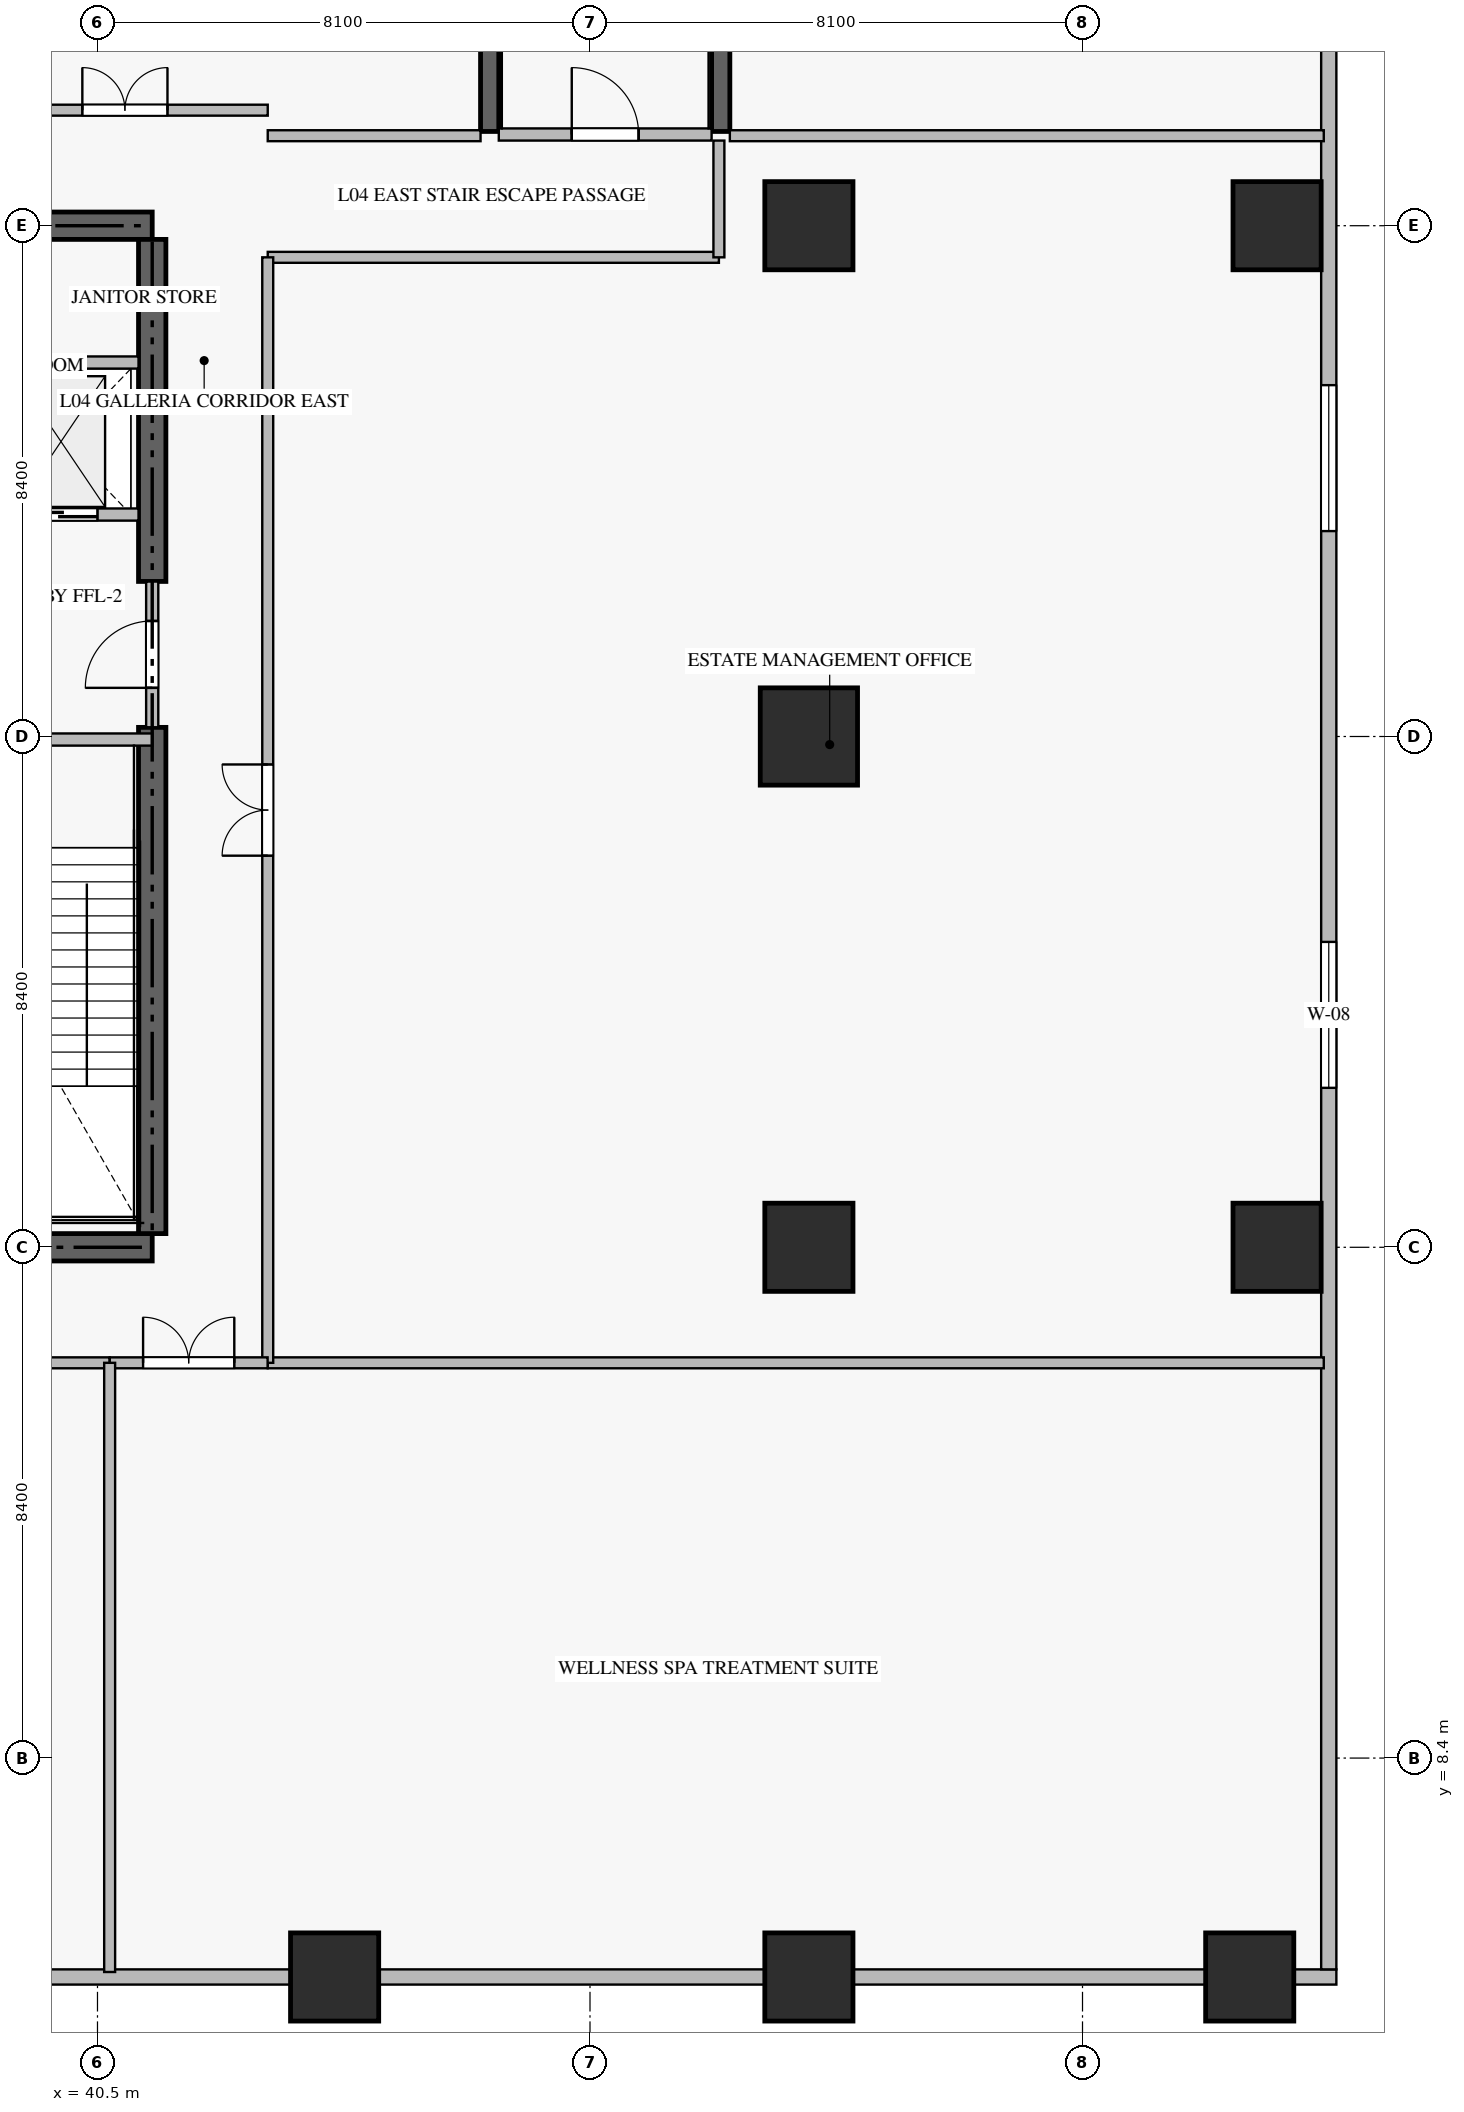
"""IFC4 building model, lengths in metres.
Left out: names, types, materials, properties, quantities, classifications, styles, units other than length and angle.
Written with IfcOpenShell. Run it as: python <this file> out.ifc"""

import sys

from ifc_helpers import new_model, si_unit, direction, frame, frame_2d, origin, origin_2d, place, context, subcontext, project, spatial, rectangle, extrude, source, transform, mapped, element, fill, save


model = new_model("IFC4")
c1 = context("Model", 3, precision=1e-05, world=origin(), true_north=direction((0.0, 1.0)))
c2 = subcontext(c1, "Body", "Model", "MODEL_VIEW")
j1 = project(units=[si_unit("LENGTHUNIT", "METRE"), si_unit("PLANEANGLEUNIT", "RADIAN")], contexts=[c1])
p1 = place(None, origin())
s1 = spatial("IfcSite", under=j1, at=p1, CompositionType="ELEMENT")
p2 = place(p1, origin())
s2 = spatial("IfcBuilding", under=s1, at=p2, CompositionType="ELEMENT")
p3 = place(p2, frame((0.0, 0.0, 21.0)))
s3 = spatial("IfcBuildingStorey", under=s2, at=p3, CompositionType="ELEMENT", Elevation=21.0)
for number, where, z_axis, x_axis in (
    (1, (23.4, 16.8, -0.85), (0.0, 0.0, 1.0), (1.0, 0.0, 0.0)),
    (2, (41.4, 33.6, -0.85), (0.0, 0.0, 1.0), (-1.0, 0.0, 0.0)),
):
    element("IfcWall", number, at=place(p3, frame(where, z_axis=z_axis, x_axis=x_axis)), inside=s3, PredefinedType="SHEAR", context=c2, shape_type="SweptSolid", body=[
        extrude(rectangle(XDim=18.0, YDim=0.45, at=frame_2d((9.0, 0.0))), origin(), (0.0, 0.0, 1.0), 6.108),
    ])
p4 = place(p3, frame((41.4, 17.025, -0.85), z_axis=(0.0, 0.0, 1.0), x_axis=(0.0, 1.0, 0.0)))
e3 = element("IfcWall", 3, at=p4, inside=s3, PredefinedType="SHEAR", context=c2, shape_type="SweptSolid", body=[
    extrude(rectangle(XDim=8.325, YDim=0.45, at=frame_2d((4.163, 0.0))), origin(), (0.0, 0.0, 1.0), 6.108),
])
p5 = place(p3, frame((41.4, 27.75, -0.85), z_axis=(0.0, 0.0, 1.0), x_axis=(0.0, 1.0, 0.0)))
e4 = element("IfcWall", 4, at=p5, inside=s3, PredefinedType="SHEAR", context=c2, shape_type="SweptSolid", body=[
    extrude(rectangle(XDim=5.625, YDim=0.45, at=frame_2d((2.812, 0.0))), origin(), (0.0, 0.0, 1.0), 6.108),
])
m1 = source(origin(), c2, "Body", "SweptSolid", [
    extrude(rectangle(XDim=1.45, YDim=1.45, at=origin_2d()), origin(), (0.0, 0.0, 1.0), 6.11),
])
for number, where, z_axis, x_axis in (
    (5, (44.4, 4.8, -0.85), (0.0, 0.0, 1.0), (1.0, 0.0, 0.0)),
    (6, (52.2, 4.8, -0.85), (0.0, 0.0, 1.0), (1.0, 0.0, 0.0)),
    (7, (52.2, 16.8, -0.85), (0.0, 0.0, 1.0), (1.0, 0.0, 0.0)),
):
    element("IfcColumn", number, at=place(p3, frame(where, z_axis=z_axis, x_axis=x_axis)), inside=s3, PredefinedType="COLUMN", context=c2, shape_type="MappedRepresentation", body=[
        mapped(m1, transform((0.0, 0.0, 0.0), scale=1.0)),
    ])
m2 = source(origin(), c2, "Body", "SweptSolid", [
    extrude(rectangle(XDim=1.6, YDim=1.6, at=origin_2d()), origin(), (0.0, 0.0, 1.0), 6.11),
])
p6 = place(p3, frame((52.2, 25.2, -0.85), z_axis=(0.0, 0.0, 1.0), x_axis=(1.0, 0.0, 0.0)))
e8 = element("IfcColumn", 8, at=p6, inside=s3, PredefinedType="COLUMN", context=c2, shape_type="MappedRepresentation", body=[
    mapped(m2, transform((0.0, 0.0, 0.0), scale=1.0)),
])
for number, where, z_axis, x_axis in (
    (9, (52.2, 33.6, -0.85), (0.0, 0.0, 1.0), (1.0, 0.0, 0.0)),
    (10, (59.9, 16.8, -0.85), (0.0, 0.0, 1.0), (1.0, 0.0, 0.0)),
    (11, (59.9, 33.6, -0.85), (0.0, 0.0, 1.0), (1.0, 0.0, 0.0)),
    (12, (59.45, 4.8, -0.85), (0.0, 0.0, 1.0), (1.0, 0.0, 0.0)),
):
    element("IfcColumn", number, at=place(p3, frame(where, z_axis=z_axis, x_axis=x_axis)), inside=s3, PredefinedType="COLUMN", context=c2, shape_type="MappedRepresentation", body=[
        mapped(m1, transform((0.0, 0.0, 0.0), scale=1.0)),
    ])
p7 = place(p3, frame((3.925, 4.8, 0.0), z_axis=(0.0, 0.0, 1.0), x_axis=(1.0, 0.0, 0.0)))
e13 = element("IfcWall", 13, at=p7, inside=s3, PredefinedType="ELEMENTEDWALL", context=c2, shape_type="SweptSolid", body=[
    extrude(rectangle(XDim=56.95, YDim=0.25, at=frame_2d((28.475, 0.0))), origin(), (0.0, 0.0, 1.0), 2.845),
])
p8 = place(p3, frame((60.75, 4.925, 0.0), z_axis=(0.0, 0.0, 1.0), x_axis=(0.0, 1.0, 0.0)))
e14 = element("IfcWall", 14, at=p8, inside=s3, PredefinedType="ELEMENTEDWALL", context=c2, shape_type="SweptSolid", body=[
    extrude(rectangle(XDim=40.55, YDim=0.25, at=frame_2d((20.275, 0.0))), origin(), (0.0, 0.0, 1.0), 5.245),
])
p9 = place(p8, frame((14.497, 0.0, 0.6)))
e15 = element("IfcOpeningElement", 15, at=p9, cuts=e14, PredefinedType="OPENING", context=c2, shape_type="SweptSolid", body=[
    extrude(rectangle(XDim=2.4, YDim=2.6, at=frame_2d((1.2, 1.3))), frame((0.0, 0.135, 0.0), z_axis=(0.0, -1.0, 0.0), x_axis=(1.0, 0.0, 0.0)), (0.0, 0.0, 1.0), 0.27),
])
p10 = place(p8, frame((23.653, 0.0, 0.6)))
e16 = element("IfcOpeningElement", 16, at=p10, cuts=e14, PredefinedType="OPENING", context=c2, shape_type="SweptSolid", body=[
    extrude(rectangle(XDim=2.4, YDim=2.6, at=frame_2d((1.2, 1.3))), frame((0.0, 0.135, 0.0), z_axis=(0.0, -1.0, 0.0), x_axis=(1.0, 0.0, 0.0)), (0.0, 0.0, 1.0), 0.27),
])
p11 = place(p3, frame((36.95, 25.15, 0.0), z_axis=(0.0, 0.0, 1.0), x_axis=(1.0, 0.0, 0.0)))
e17 = element("IfcWall", 17, at=p11, inside=s3, PredefinedType="STANDARD", context=c2, shape_type="SweptSolid", body=[
    extrude(rectangle(XDim=4.45, YDim=0.2, at=frame_2d((2.225, 0.0))), origin(), (0.0, 0.0, 1.0), 5.26),
])
p12 = place(p11, frame((1.65, 0.0, 0.0)))
e18 = element("IfcOpeningElement", 18, at=p12, cuts=e17, PredefinedType="OPENING", context=c2, shape_type="SweptSolid", body=[
    extrude(rectangle(XDim=1.1, YDim=2.15, at=frame_2d((0.55, 1.075))), frame((0.0, 0.11, 0.0), z_axis=(0.0, -1.0, 0.0), x_axis=(1.0, 0.0, 0.0)), (0.0, 0.0, 1.0), 0.22),
])
for number, where, z_axis, x_axis in (
    (19, (46.95, 35.15, -0.85), (0.0, 0.0, 1.0), (0.0, 1.0, 0.0)),
    (20, (50.75, 35.15, -0.85), (0.0, 0.0, 1.0), (0.0, 1.0, 0.0)),
):
    element("IfcWall", number, at=place(p3, frame(where, z_axis=z_axis, x_axis=x_axis)), inside=s3, PredefinedType="SHEAR", context=c2, shape_type="SweptSolid", body=[
        extrude(rectangle(XDim=7.9, YDim=0.3, at=frame_2d((3.95, 0.0))), origin(), (0.0, 0.0, 1.0), 6.108),
    ])
p13 = place(p3, frame((47.1, 35.1, 0.0), z_axis=(0.0, 0.0, 1.0), x_axis=(1.0, 0.0, 0.0)))
e21 = element("IfcWall", 21, at=p13, inside=s3, PredefinedType="STANDARD", context=c2, shape_type="SweptSolid", body=[
    extrude(rectangle(XDim=3.5, YDim=0.2, at=frame_2d((1.75, 0.0))), origin(), (0.0, 0.0, 1.0), 5.26),
])
p14 = place(p13, frame((1.2, 0.0, 0.0)))
e22 = element("IfcOpeningElement", 22, at=p14, cuts=e21, PredefinedType="OPENING", context=c2, shape_type="SweptSolid", body=[
    extrude(rectangle(XDim=1.1, YDim=2.15, at=frame_2d((0.55, 1.075))), frame((0.0, 0.11, 0.0), z_axis=(0.0, -1.0, 0.0), x_axis=(1.0, 0.0, 0.0)), (0.0, 0.0, 1.0), 0.22),
])
p15 = place(p3, frame((38.75, 28.85, 0.0), z_axis=(0.0, 0.0, 1.0), x_axis=(1.0, 0.0, 0.0)))
e23 = element("IfcWall", 23, at=p15, inside=s3, PredefinedType="STANDARD", context=c2, shape_type="SweptSolid", body=[
    extrude(rectangle(XDim=2.425, YDim=0.2, at=frame_2d((1.212, 0.0))), origin(), (0.0, 0.0, 1.0), 5.26),
])
p16 = place(p15, frame((0.55, 0.0, 0.0)))
e24 = element("IfcOpeningElement", 24, at=p16, cuts=e23, PredefinedType="OPENING", context=c2, shape_type="SweptSolid", body=[
    extrude(rectangle(XDim=1.2, YDim=2.2, at=frame_2d((0.6, 1.1))), frame((0.0, 0.11, 0.0), z_axis=(0.0, -1.0, 0.0), x_axis=(1.0, 0.0, 0.0)), (0.0, 0.0, 1.0), 0.22),
])
p17 = place(p3, frame((38.75, 31.35, 0.0), z_axis=(0.0, 0.0, 1.0), x_axis=(1.0, 0.0, 0.0)))
e25 = element("IfcWall", 25, at=p17, inside=s3, PredefinedType="STANDARD", context=c2, shape_type="SweptSolid", body=[
    extrude(rectangle(XDim=2.425, YDim=0.2, at=frame_2d((1.212, 0.0))), origin(), (0.0, 0.0, 1.0), 5.26),
])
p18 = place(p3, frame((41.4, 25.352, 0.0), z_axis=(0.0, 0.0, 1.0), x_axis=(0.0, 1.0, 0.0)))
e26 = element("IfcWall", 26, at=p18, inside=s3, PredefinedType="STANDARD", context=c2, shape_type="SweptSolid", body=[
    extrude(rectangle(XDim=2.396, YDim=0.2, at=frame_2d((1.198, 0.0))), origin(), (0.0, 0.0, 1.0), 5.26),
])
p19 = place(p18, frame((0.648, 0.0, 0.0)))
e27 = element("IfcOpeningElement", 27, at=p19, cuts=e26, PredefinedType="OPENING", context=c2, shape_type="SweptSolid", body=[
    extrude(rectangle(XDim=1.1, YDim=2.15, at=frame_2d((0.55, 1.075))), frame((0.0, 0.11, 0.0), z_axis=(0.0, -1.0, 0.0), x_axis=(1.0, 0.0, 0.0)), (0.0, 0.0, 1.0), 0.22),
])
p20 = place(p3, frame((43.3, 14.9, 0.0), z_axis=(0.0, 0.0, 1.0), x_axis=(1.0, 0.0, 0.0)))
e28 = element("IfcWall", 28, at=p20, inside=s3, PredefinedType="PARTITIONING", context=c2, shape_type="SweptSolid", body=[
    extrude(rectangle(XDim=17.368, YDim=0.18, at=frame_2d((8.684, 0.0))), origin(), (0.0, 0.0, 1.0), 5.26),
])
p21 = place(p3, frame((43.3, 35.08, 0.0), z_axis=(0.0, 0.0, 1.0), x_axis=(1.0, 0.0, 0.0)))
e29 = element("IfcWall", 29, at=p21, inside=s3, PredefinedType="PARTITIONING", context=c2, shape_type="SweptSolid", body=[
    extrude(rectangle(XDim=3.5, YDim=0.18, at=frame_2d((1.75, 0.0))), origin(), (0.0, 0.0, 1.0), 5.26),
])
p22 = place(p3, frame((43.3, 33.08, 0.0), z_axis=(0.0, 0.0, 1.0), x_axis=(1.0, 0.0, 0.0)))
e30 = element("IfcWall", 30, at=p22, inside=s3, PredefinedType="PARTITIONING", context=c2, shape_type="SweptSolid", body=[
    extrude(rectangle(XDim=7.42, YDim=0.18, at=frame_2d((3.71, 0.0))), origin(), (0.0, 0.0, 1.0), 2.845),
])
p23 = place(p3, frame((50.9, 35.08, 0.0), z_axis=(0.0, 0.0, 1.0), x_axis=(1.0, 0.0, 0.0)))
e31 = element("IfcWall", 31, at=p23, inside=s3, PredefinedType="PARTITIONING", context=c2, shape_type="SweptSolid", body=[
    extrude(rectangle(XDim=9.768, YDim=0.18, at=frame_2d((4.884, 0.0))), origin(), (0.0, 0.0, 1.0), 5.26),
])
p24 = place(p3, frame((50.72, 33.08, 0.0), z_axis=(0.0, 0.0, 1.0), x_axis=(0.0, 1.0, 0.0)))
e32 = element("IfcWall", 32, at=p24, inside=s3, PredefinedType="PARTITIONING", context=c2, shape_type="SweptSolid", body=[
    extrude(rectangle(XDim=1.92, YDim=0.18, at=frame_2d((0.96, 0.0))), origin(), (0.0, 0.0, 1.0), 5.26),
])
p25 = place(p3, frame((43.3, 14.9, 0.0), z_axis=(0.0, 0.0, 1.0), x_axis=(0.0, 1.0, 0.0)))
e33 = element("IfcWall", 33, at=p25, inside=s3, PredefinedType="PARTITIONING", context=c2, shape_type="SweptSolid", body=[
    extrude(rectangle(XDim=18.18, YDim=0.18, at=frame_2d((9.09, 0.0))), origin(), (0.0, 0.0, 1.0), 5.26),
])
p26 = place(p25, frame((8.34, 0.0, 0.0)))
e34 = element("IfcOpeningElement", 34, at=p26, cuts=e33, PredefinedType="OPENING", context=c2, shape_type="SweptSolid", body=[
    extrude(rectangle(XDim=1.5, YDim=2.25, at=frame_2d((0.75, 1.125))), frame((0.0, 0.1, 0.0), z_axis=(0.0, -1.0, 0.0), x_axis=(1.0, 0.0, 0.0)), (0.0, 0.0, 1.0), 0.2),
])
p27 = place(p3, frame((30.602, 14.9, 0.0), z_axis=(0.0, 0.0, 1.0), x_axis=(1.0, 0.0, 0.0)))
e35 = element("IfcWall", 35, at=p27, inside=s3, PredefinedType="PARTITIONING", context=c2, shape_type="SweptSolid", body=[
    extrude(rectangle(XDim=10.098, YDim=0.18, at=frame_2d((5.049, 0.0))), origin(), (0.0, 0.0, 1.0), 5.26),
])
p28 = place(p27, frame((4.249, 0.0, 0.0)))
e36 = element("IfcOpeningElement", 36, at=p28, cuts=e35, PredefinedType="OPENING", context=c2, shape_type="SweptSolid", body=[
    extrude(rectangle(XDim=1.6, YDim=2.3, at=frame_2d((0.8, 1.15))), frame((0.0, 0.1, 0.0), z_axis=(0.0, -1.0, 0.0), x_axis=(1.0, 0.0, 0.0)), (0.0, 0.0, 1.0), 0.2),
])
p29 = place(p3, frame((40.702, 14.9, 0.0), z_axis=(0.0, 0.0, 1.0), x_axis=(1.0, 0.0, 0.0)))
e37 = element("IfcWall", 37, at=p29, inside=s3, PredefinedType="PARTITIONING", context=c2, shape_type="SweptSolid", body=[
    extrude(rectangle(XDim=2.596, YDim=0.18, at=frame_2d((1.298, 0.0))), origin(), (0.0, 0.0, 1.0), 5.26),
])
p30 = place(p29, frame((0.548, 0.0, 0.0)))
e38 = element("IfcOpeningElement", 38, at=p30, cuts=e37, PredefinedType="OPENING", context=c2, shape_type="SweptSolid", body=[
    extrude(rectangle(XDim=1.5, YDim=2.25, at=frame_2d((0.75, 1.125))), frame((0.0, 0.1, 0.0), z_axis=(0.0, -1.0, 0.0), x_axis=(1.0, 0.0, 0.0)), (0.0, 0.0, 1.0), 0.2),
])
p31 = place(p3, frame((38.602, 35.5, 0.0), z_axis=(0.0, 0.0, 1.0), x_axis=(1.0, 0.0, 0.0)))
e39 = element("IfcWall", 39, at=p31, inside=s3, PredefinedType="PARTITIONING", context=c2, shape_type="SweptSolid", body=[
    extrude(rectangle(XDim=4.698, YDim=0.18, at=frame_2d((2.349, 0.0))), origin(), (0.0, 0.0, 1.0), 5.26),
])
p32 = place(p31, frame((1.649, 0.0, 0.0)))
e40 = element("IfcOpeningElement", 40, at=p32, cuts=e39, PredefinedType="OPENING", context=c2, shape_type="SweptSolid", body=[
    extrude(rectangle(XDim=1.4, YDim=2.25, at=frame_2d((0.7, 1.125))), frame((0.0, 0.1, 0.0), z_axis=(0.0, -1.0, 0.0), x_axis=(1.0, 0.0, 0.0)), (0.0, 0.0, 1.0), 0.2),
])
p33 = place(p3, frame((40.7, 4.882, 0.0), z_axis=(0.0, 0.0, 1.0), x_axis=(0.0, 1.0, 0.0)))
e41 = element("IfcWall", 41, at=p33, inside=s3, PredefinedType="PARTITIONING", context=c2, shape_type="SweptSolid", body=[
    extrude(rectangle(XDim=10.018, YDim=0.18, at=frame_2d((5.009, 0.0))), origin(), (0.0, 0.0, 1.0), 5.26),
])
m3 = source(origin(), c2, "Body", "SweptSolid", [
    extrude(rectangle(XDim=2.4, YDim=2.6, at=frame_2d((1.2, 1.3))), frame((0.0, 0.03, 0.0), z_axis=(0.0, -1.0, 0.0), x_axis=(1.0, 0.0, 0.0)), (0.0, 0.0, 1.0), 0.06),
])
p34 = place(p9, origin())
e42 = element("IfcWindow", 42, at=p34, inside=s3, PartitioningType="SINGLE_PANEL", PredefinedType="WINDOW", context=c2, shape_type="MappedRepresentation", body=[
    mapped(m3, transform((0.0, 0.0, 0.0), scale=1.0)),
])
fill(e15, e42)
p35 = place(p10, origin())
e43 = element("IfcWindow", 43, at=p35, inside=s3, PartitioningType="SINGLE_PANEL", PredefinedType="WINDOW", context=c2, shape_type="MappedRepresentation", body=[
    mapped(m3, transform((0.0, 0.0, 0.0), scale=1.0)),
])
fill(e16, e43)
m4 = source(origin(), c2, "Body", "SweptSolid", [
    extrude(rectangle(XDim=1.1, YDim=2.15, at=frame_2d((0.55, 1.075))), frame((0.0, 0.025, 0.0), z_axis=(0.0, -1.0, 0.0), x_axis=(1.0, 0.0, 0.0)), (0.0, 0.0, 1.0), 0.05),
])
p36 = place(p14, origin())
e44 = element("IfcDoor", 44, at=p36, inside=s3, OperationType="SINGLE_SWING_LEFT", PredefinedType="DOOR", context=c2, shape_type="MappedRepresentation", body=[
    mapped(m4, transform((0.0, 0.0, 0.0), scale=1.0)),
])
fill(e22, e44)
m5 = source(origin(), c2, "Body", "SweptSolid", [
    extrude(rectangle(XDim=1.2, YDim=2.2, at=frame_2d((0.6, 1.1))), frame((0.0, 0.025, 0.0), z_axis=(0.0, -1.0, 0.0), x_axis=(1.0, 0.0, 0.0)), (0.0, 0.0, 1.0), 0.05),
])
p37 = place(p16, origin())
e45 = element("IfcDoor", 45, at=p37, inside=s3, OperationType="DOUBLE_DOOR_SLIDING", PredefinedType="DOOR", context=c2, shape_type="MappedRepresentation", body=[
    mapped(m5, transform((0.0, 0.0, 0.0), scale=1.0)),
])
fill(e24, e45)
p38 = place(p19, origin())
e46 = element("IfcDoor", 46, at=p38, inside=s3, OperationType="SINGLE_SWING_LEFT", PredefinedType="DOOR", context=c2, shape_type="MappedRepresentation", body=[
    mapped(m4, transform((0.0, 0.0, 0.0), scale=1.0)),
])
fill(e27, e46)
m6 = source(origin(), c2, "Body", "SweptSolid", [
    extrude(rectangle(XDim=1.5, YDim=2.25, at=frame_2d((0.75, 1.125))), frame((0.0, 0.025, 0.0), z_axis=(0.0, -1.0, 0.0), x_axis=(1.0, 0.0, 0.0)), (0.0, 0.0, 1.0), 0.05),
])
p39 = place(p26, origin())
e47 = element("IfcDoor", 47, at=p39, inside=s3, OperationType="DOUBLE_DOOR_SINGLE_SWING", PredefinedType="DOOR", context=c2, shape_type="MappedRepresentation", body=[
    mapped(m6, transform((0.0, 0.0, 0.0), scale=1.0)),
])
fill(e34, e47)
p40 = place(p30, origin())
e48 = element("IfcDoor", 48, at=p40, inside=s3, OperationType="DOUBLE_DOOR_SINGLE_SWING", PredefinedType="DOOR", context=c2, shape_type="MappedRepresentation", body=[
    mapped(m6, transform((0.0, 0.0, 0.0), scale=1.0)),
])
fill(e38, e48)
m7 = source(origin(), c2, "Body", "SweptSolid", [
    extrude(rectangle(XDim=1.4, YDim=2.25, at=frame_2d((0.7, 1.125))), frame((0.0, 0.025, 0.0), z_axis=(0.0, -1.0, 0.0), x_axis=(1.0, 0.0, 0.0)), (0.0, 0.0, 1.0), 0.05),
])
p41 = place(p32, origin())
e49 = element("IfcDoor", 49, at=p41, inside=s3, OperationType="DOUBLE_DOOR_SINGLE_SWING", PredefinedType="DOOR", context=c2, shape_type="MappedRepresentation", body=[
    mapped(m7, transform((0.0, 0.0, 0.0), scale=1.0)),
])
fill(e40, e49)
save(model, sys.argv[1])
